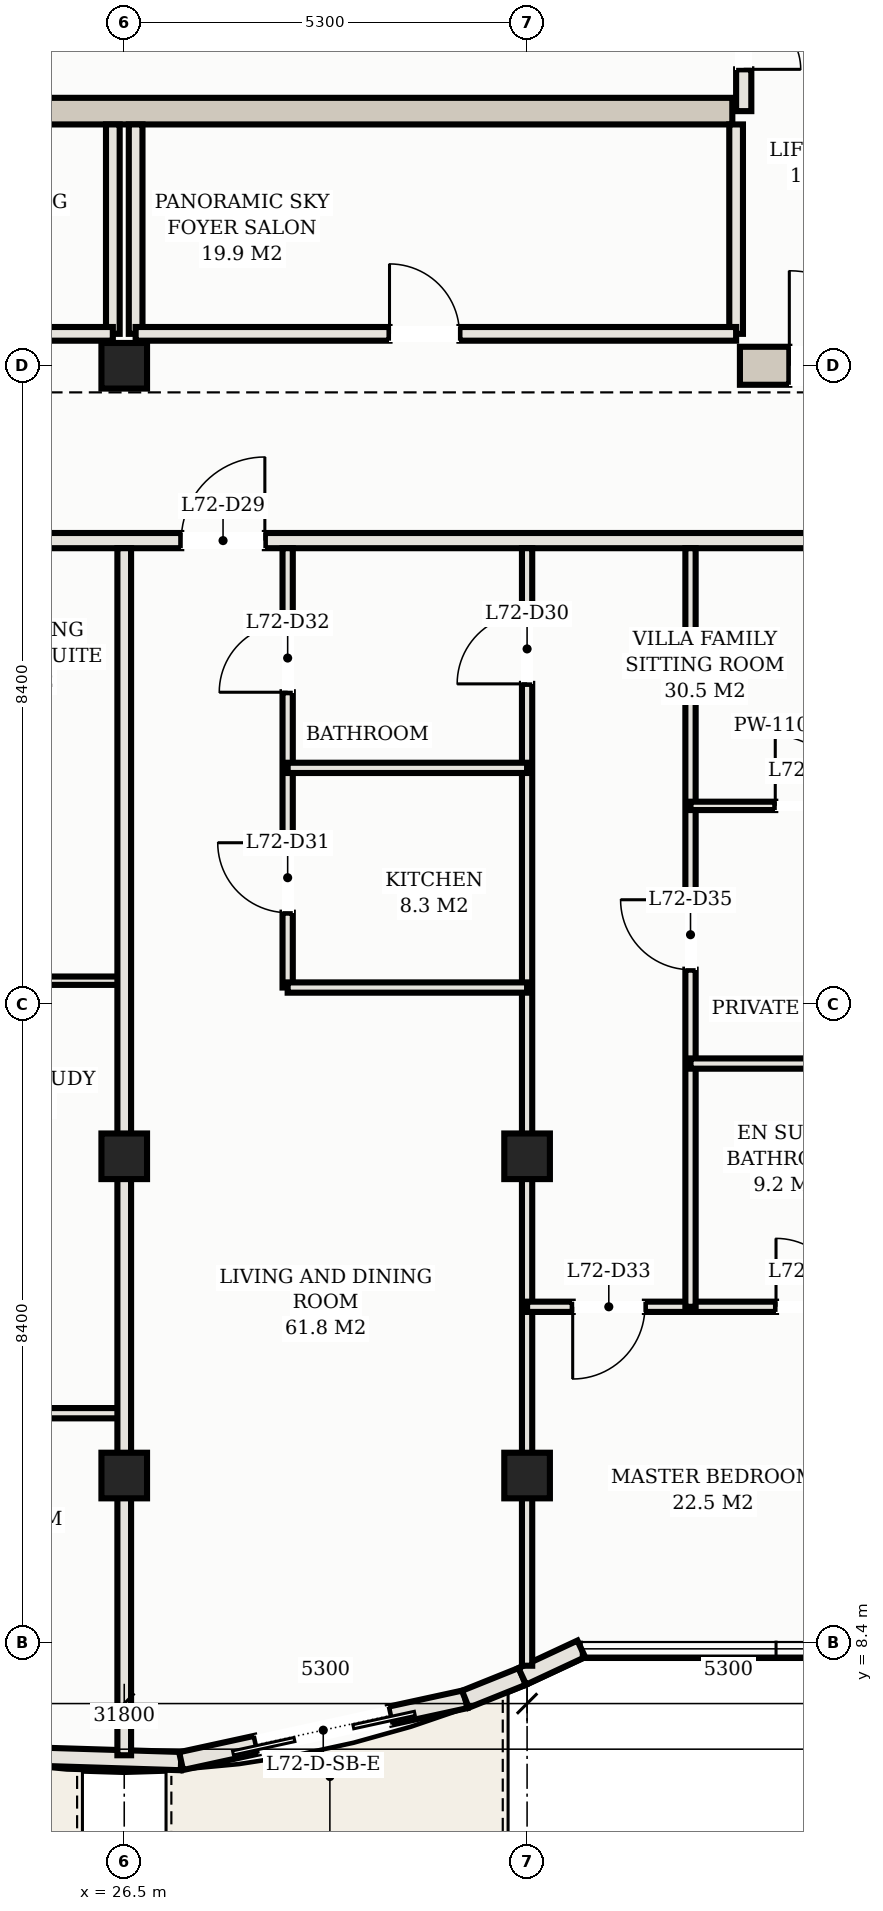
"""IFC4 building model, lengths in metres.
Left out: names, types, materials, properties, quantities, classifications, styles, units other than length and angle.
Written with IfcOpenShell. Run it as: python <this file> out.ifc"""

import sys

from ifc_helpers import new_model, si_unit, direction, frame, frame_2d, origin, origin_2d, place, context, subcontext, project, spatial, rectangle, hollow_rectangle, extrude, element, fill, save


model = new_model("IFC4")
c1 = context("Model", 3, precision=1e-05, world=origin(), true_north=direction((0.0, 1.0)))
c2 = subcontext(c1, "Body", "Model", "MODEL_VIEW")
j1 = project(units=[si_unit("LENGTHUNIT", "METRE"), si_unit("PLANEANGLEUNIT", "RADIAN")], contexts=[c1])
p1 = place(None, origin())
s1 = spatial("IfcSite", under=j1, at=p1, CompositionType="ELEMENT")
p2 = place(p1, origin())
s2 = spatial("IfcBuilding", under=s1, at=p2, CompositionType="ELEMENT")
p3 = place(p2, frame((0.0, 0.0, 259.4)))
s3 = spatial("IfcBuildingStorey", under=s2, at=p3, CompositionType="ELEMENT", Elevation=259.4)
p4 = place(p3, frame((34.6, 25.2, 0.0), z_axis=(0.0, 0.0, 1.0), x_axis=(1.0, 0.0, 0.0)))
e1 = element("IfcWall", 1, at=p4, inside=s3, PredefinedType="SHEAR", context=c2, shape_type="SweptSolid", body=[
    extrude(rectangle(XDim=8.05, YDim=0.5, at=frame_2d((4.025, 0.0))), origin(), (0.0, 0.0, 1.0), 3.11),
])
p5 = place(p4, frame((0.65, 0.0, 0.0)))
e2 = element("IfcOpeningElement", 2, at=p5, cuts=e1, PredefinedType="OPENING", context=c2, shape_type="SweptSolid", body=[
    extrude(rectangle(XDim=1.25, YDim=2.2, at=frame_2d((0.625, 1.1))), frame((0.0, 0.26, 0.0), z_axis=(0.0, -1.0, 0.0), x_axis=(1.0, 0.0, 0.0)), (0.0, 0.0, 1.0), 0.52),
])
p6 = place(p3, frame((18.5, 28.55, 0.0), z_axis=(0.0, 0.0, 1.0), x_axis=(1.0, 0.0, 0.0)))
e3 = element("IfcWall", 3, at=p6, inside=s3, PredefinedType="SHEAR", context=c2, shape_type="SweptSolid", body=[
    extrude(rectangle(XDim=16.0, YDim=0.35, at=frame_2d((8.0, 0.0))), origin(), (0.0, 0.0, 1.0), 3.11),
])
for number, where, z_axis, x_axis in (
    (4, (26.5, 25.2, 0.0), (0.0, 0.0, 1.0), (1.0, 0.0, 0.0)),
    (5, (26.5, 14.8, 0.0), (0.0, 0.0, 1.0), (1.0, 0.0, 0.0)),
    (6, (26.5, 10.6, 0.0), (0.0, 0.0, 1.0), (1.0, 0.0, 0.0)),
    (7, (31.8, 14.8, 0.0), (0.0, 0.0, 1.0), (1.0, 0.0, 0.0)),
    (8, (31.8, 10.6, 0.0), (0.0, 0.0, 1.0), (1.0, 0.0, 0.0)),
):
    element("IfcColumn", number, at=place(p3, frame(where, z_axis=z_axis, x_axis=x_axis)), inside=s3, PredefinedType="COLUMN", context=c2, shape_type="SweptSolid", body=[
        extrude(hollow_rectangle(XDim=0.6, YDim=0.6, WallThickness=0.022, at=origin_2d()), origin(), (0.0, 0.0, 1.0), 3.3),
    ])
p7 = place(p3, frame((25.005, 6.913, 0.0), z_axis=(0.0, 0.0, 1.0), x_axis=(0.99951250052, -0.031221167572, 0.0)))
e9 = element("IfcWall", 9, at=p7, inside=s3, PredefinedType="SOLIDWALL", context=c2, shape_type="SweptSolid", body=[
    extrude(rectangle(XDim=2.244, YDim=0.24, at=frame_2d((1.122, 0.0))), origin(), (0.0, 0.0, 1.0), 3.11),
])
p8 = place(p3, frame((27.248, 6.843, 0.0), z_axis=(0.0, 0.0, 1.0), x_axis=(0.977126252677, 0.212660025225, 0.0)))
e10 = element("IfcWall", 10, at=p8, inside=s3, PredefinedType="SOLIDWALL", context=c2, shape_type="SweptSolid", body=[
    extrude(rectangle(XDim=3.828, YDim=0.24, at=frame_2d((1.914, 0.0))), origin(), (0.0, 0.0, 1.0), 3.11),
])
p9 = place(p8, frame((1.014, 0.0, 0.0)))
e11 = element("IfcOpeningElement", 11, at=p9, cuts=e10, PredefinedType="OPENING", context=c2, shape_type="SweptSolid", body=[
    extrude(rectangle(XDim=1.8, YDim=2.2, at=frame_2d((0.9, 1.1))), frame((0.0, 0.13, 0.0), z_axis=(0.0, -1.0, 0.0), x_axis=(1.0, 0.0, 0.0)), (0.0, 0.0, 1.0), 0.26),
])
p10 = place(p3, frame((30.988, 7.657, 0.0), z_axis=(0.0, 0.0, 1.0), x_axis=(0.927870589467, 0.372902358805, 0.0)))
e12 = element("IfcWall", 12, at=p10, inside=s3, PredefinedType="SOLIDWALL", context=c2, shape_type="SweptSolid", body=[
    extrude(rectangle(XDim=0.807, YDim=0.24, at=frame_2d((0.404, 0.0))), origin(), (0.0, 0.0, 1.0), 3.11),
])
p11 = place(p3, frame((31.737, 7.958, 0.0), z_axis=(0.0, 0.0, 1.0), x_axis=(0.906190424584, 0.422869855147, 0.0)))
e13 = element("IfcWall", 13, at=p11, inside=s3, PredefinedType="SOLIDWALL", context=c2, shape_type="SweptSolid", body=[
    extrude(rectangle(XDim=0.856, YDim=0.24, at=frame_2d((0.428, 0.0))), origin(), (0.0, 0.0, 1.0), 3.11),
])
p12 = place(p3, frame((34.65, 28.55, 0.0), z_axis=(0.0, 0.0, 1.0), x_axis=(0.0, 1.0, 0.0)))
e14 = element("IfcWall", 14, at=p12, inside=s3, PredefinedType="PARTITIONING", context=c2, shape_type="SweptSolid", body=[
    extrude(rectangle(XDim=2.6, YDim=0.2, at=frame_2d((1.3, 0.0))), origin(), (0.0, 0.0, 1.0), 2.45),
])
p13 = place(p12, frame((0.55, 0.0, 0.0)))
e15 = element("IfcOpeningElement", 15, at=p13, cuts=e14, PredefinedType="OPENING", context=c2, shape_type="SweptSolid", body=[
    extrude(rectangle(XDim=1.5, YDim=2.25, at=frame_2d((0.75, 1.125))), frame((0.0, 0.11, 0.0), z_axis=(0.0, -1.0, 0.0), x_axis=(1.0, 0.0, 0.0)), (0.0, 0.0, 1.0), 0.22),
])
p14 = place(p3, frame((26.35, 25.62, 0.0), z_axis=(0.0, 0.0, 1.0), x_axis=(0.0, 1.0, 0.0)))
e16 = element("IfcWall", 16, at=p14, inside=s3, PredefinedType="PARTITIONING", context=c2, shape_type="SweptSolid", body=[
    extrude(rectangle(XDim=2.755, YDim=0.18, at=frame_2d((1.377, 0.0))), origin(), (0.0, 0.0, 1.0), 2.45),
])
p15 = place(p3, frame((18.45, 25.62, 0.0), z_axis=(0.0, 0.0, 1.0), x_axis=(1.0, 0.0, 0.0)))
e17 = element("IfcWall", 17, at=p15, inside=s3, PredefinedType="PARTITIONING", context=c2, shape_type="SweptSolid", body=[
    extrude(rectangle(XDim=7.9, YDim=0.18, at=frame_2d((3.95, 0.0))), origin(), (0.0, 0.0, 1.0), 2.45),
])
p16 = place(p15, frame((3.34, 0.0, 0.0)))
e18 = element("IfcOpeningElement", 18, at=p16, cuts=e17, PredefinedType="OPENING", context=c2, shape_type="SweptSolid", body=[
    extrude(rectangle(XDim=0.92, YDim=2.15, at=frame_2d((0.46, 1.075))), frame((0.0, 0.1, 0.0), z_axis=(0.0, -1.0, 0.0), x_axis=(1.0, 0.0, 0.0)), (0.0, 0.0, 1.0), 0.2),
])
for number, where, z_axis, x_axis in (
    (19, (26.65, 25.62, 0.0), (0.0, 0.0, 1.0), (0.0, 1.0, 0.0)),
    (20, (34.55, 25.62, 0.0), (0.0, 0.0, 1.0), (0.0, 1.0, 0.0)),
):
    element("IfcWall", number, at=place(p3, frame(where, z_axis=z_axis, x_axis=x_axis)), inside=s3, PredefinedType="PARTITIONING", context=c2, shape_type="SweptSolid", body=[
        extrude(rectangle(XDim=2.755, YDim=0.18, at=frame_2d((1.377, 0.0))), origin(), (0.0, 0.0, 1.0), 2.45),
    ])
p17 = place(p3, frame((26.65, 25.62, 0.0), z_axis=(0.0, 0.0, 1.0), x_axis=(1.0, 0.0, 0.0)))
e21 = element("IfcWall", 21, at=p17, inside=s3, PredefinedType="PARTITIONING", context=c2, shape_type="SweptSolid", body=[
    extrude(rectangle(XDim=7.9, YDim=0.18, at=frame_2d((3.95, 0.0))), origin(), (0.0, 0.0, 1.0), 2.45),
])
p18 = place(p17, frame((3.34, 0.0, 0.0)))
e22 = element("IfcOpeningElement", 22, at=p18, cuts=e21, PredefinedType="OPENING", context=c2, shape_type="SweptSolid", body=[
    extrude(rectangle(XDim=0.92, YDim=2.15, at=frame_2d((0.46, 1.075))), frame((0.0, 0.1, 0.0), z_axis=(0.0, -1.0, 0.0), x_axis=(1.0, 0.0, 0.0)), (0.0, 0.0, 1.0), 0.2),
])
p19 = place(p3, frame((8.6, 22.9, 0.0), z_axis=(0.0, 0.0, 1.0), x_axis=(1.0, 0.0, 0.0)))
e23 = element("IfcWall", 23, at=p19, inside=s3, PredefinedType="PARTITIONING", context=c2, shape_type="SweptSolid", body=[
    extrude(rectangle(XDim=35.8, YDim=0.2, at=frame_2d((17.9, 0.0))), origin(), (0.0, 0.0, 1.0), 2.45),
])
p20 = place(p19, frame((2.625, 0.0, 0.0)))
e24 = element("IfcOpeningElement", 24, at=p20, cuts=e23, PredefinedType="OPENING", context=c2, shape_type="SweptSolid", body=[
    extrude(rectangle(XDim=1.35, YDim=2.33, at=frame_2d((0.675, 1.165))), frame((0.0, 0.11, 0.0), z_axis=(0.0, -1.0, 0.0), x_axis=(1.0, 0.0, 0.0)), (0.0, 0.0, 1.0), 0.22),
])
p21 = place(p19, frame((18.65, 0.0, 0.0)))
e25 = element("IfcOpeningElement", 25, at=p21, cuts=e23, PredefinedType="OPENING", context=c2, shape_type="SweptSolid", body=[
    extrude(rectangle(XDim=1.1, YDim=2.25, at=frame_2d((0.55, 1.125))), frame((0.0, 0.11, 0.0), z_axis=(0.0, -1.0, 0.0), x_axis=(1.0, 0.0, 0.0)), (0.0, 0.0, 1.0), 0.22),
])
p22 = place(p19, frame((29.25, 0.0, 0.0)))
e26 = element("IfcOpeningElement", 26, at=p22, cuts=e23, PredefinedType="OPENING", context=c2, shape_type="SweptSolid", body=[
    extrude(rectangle(XDim=1.1, YDim=2.25, at=frame_2d((0.55, 1.125))), frame((0.0, 0.11, 0.0), z_axis=(0.0, -1.0, 0.0), x_axis=(1.0, 0.0, 0.0)), (0.0, 0.0, 1.0), 0.22),
])
p23 = place(p19, frame((0.505, 0.0, 0.0)))
e27 = element("IfcOpeningElement", 27, at=p23, cuts=e23, PredefinedType="OPENING", context=c2, shape_type="SweptSolid", body=[
    extrude(rectangle(XDim=0.9, YDim=2.15, at=frame_2d((0.45, 1.075))), frame((0.0, 0.11, 0.0), z_axis=(0.0, -1.0, 0.0), x_axis=(1.0, 0.0, 0.0)), (0.0, 0.0, 1.0), 0.22),
])
p24 = place(p19, frame((34.395, 0.0, 0.0)))
e28 = element("IfcOpeningElement", 28, at=p24, cuts=e23, PredefinedType="OPENING", context=c2, shape_type="SweptSolid", body=[
    extrude(rectangle(XDim=0.9, YDim=2.15, at=frame_2d((0.45, 1.075))), frame((0.0, 0.11, 0.0), z_axis=(0.0, -1.0, 0.0), x_axis=(1.0, 0.0, 0.0)), (0.0, 0.0, 1.0), 0.22),
])
p25 = place(p3, frame((21.2, 11.42, 0.0), z_axis=(0.0, 0.0, 1.0), x_axis=(1.0, 0.0, 0.0)))
e29 = element("IfcWall", 29, at=p25, inside=s3, PredefinedType="PARTITIONING", context=c2, shape_type="SweptSolid", body=[
    extrude(rectangle(XDim=5.3, YDim=0.135, at=frame_2d((2.65, 0.0))), origin(), (0.0, 0.0, 1.0), 2.45),
])
p26 = place(p25, frame((0.8, 0.0, 0.0)))
e30 = element("IfcOpeningElement", 30, at=p26, cuts=e29, PredefinedType="OPENING", context=c2, shape_type="SweptSolid", body=[
    extrude(rectangle(XDim=0.95, YDim=2.15, at=frame_2d((0.475, 1.075))), frame((0.0, 0.078, 0.0), z_axis=(0.0, -1.0, 0.0), x_axis=(1.0, 0.0, 0.0)), (0.0, 0.0, 1.0), 0.155),
])
p27 = place(p3, frame((23.35, 17.11, 0.0), z_axis=(0.0, 0.0, 1.0), x_axis=(1.0, 0.0, 0.0)))
e31 = element("IfcWall", 31, at=p27, inside=s3, PredefinedType="MOVABLE", context=c2, shape_type="SweptSolid", body=[
    extrude(rectangle(XDim=3.15, YDim=0.11, at=frame_2d((1.575, 0.0))), origin(), (0.0, 0.0, 1.0), 2.45),
])
p28 = place(p3, frame((26.5, 6.92, 0.0), z_axis=(0.0, 0.0, 1.0), x_axis=(0.0, 1.0, 0.0)))
e32 = element("IfcWall", 32, at=p28, inside=s3, PredefinedType="PARTITIONING", context=c2, shape_type="SweptSolid", body=[
    extrude(rectangle(XDim=15.88, YDim=0.18, at=frame_2d((7.94, 0.0))), origin(), (0.0, 0.0, 1.0), 2.45),
])
p29 = place(p3, frame((31.8, 8.098, 0.0), z_axis=(0.0, 0.0, 1.0), x_axis=(0.0, 1.0, 0.0)))
e33 = element("IfcWall", 33, at=p29, inside=s3, PredefinedType="PARTITIONING", context=c2, shape_type="SweptSolid", body=[
    extrude(rectangle(XDim=14.702, YDim=0.135, at=frame_2d((7.351, 0.0))), origin(), (0.0, 0.0, 1.0), 2.45),
])
p30 = place(p29, frame((12.917, 0.0, 0.0)))
e34 = element("IfcOpeningElement", 34, at=p30, cuts=e33, PredefinedType="OPENING", context=c2, shape_type="SweptSolid", body=[
    extrude(rectangle(XDim=0.92, YDim=2.15, at=frame_2d((0.46, 1.075))), frame((0.0, 0.078, 0.0), z_axis=(0.0, -1.0, 0.0), x_axis=(1.0, 0.0, 0.0)), (0.0, 0.0, 1.0), 0.155),
])
p31 = place(p3, frame((28.65, 17.02, 0.0), z_axis=(0.0, 0.0, 1.0), x_axis=(0.0, 1.0, 0.0)))
e35 = element("IfcWall", 35, at=p31, inside=s3, PredefinedType="PARTITIONING", context=c2, shape_type="SweptSolid", body=[
    extrude(rectangle(XDim=5.78, YDim=0.135, at=frame_2d((2.89, 0.0))), origin(), (0.0, 0.0, 1.0), 2.45),
])
p32 = place(p31, frame((0.985, 0.0, 0.0)))
e36 = element("IfcOpeningElement", 36, at=p32, cuts=e35, PredefinedType="OPENING", context=c2, shape_type="SweptSolid", body=[
    extrude(rectangle(XDim=0.92, YDim=2.15, at=frame_2d((0.46, 1.075))), frame((0.0, 0.078, 0.0), z_axis=(0.0, -1.0, 0.0), x_axis=(1.0, 0.0, 0.0)), (0.0, 0.0, 1.0), 0.155),
])
p33 = place(p31, frame((3.885, 0.0, 0.0)))
e37 = element("IfcOpeningElement", 37, at=p33, cuts=e35, PredefinedType="OPENING", context=c2, shape_type="SweptSolid", body=[
    extrude(rectangle(XDim=0.9, YDim=2.15, at=frame_2d((0.45, 1.075))), frame((0.0, 0.078, 0.0), z_axis=(0.0, -1.0, 0.0), x_axis=(1.0, 0.0, 0.0)), (0.0, 0.0, 1.0), 0.155),
])
for number, where, z_axis, x_axis in (
    (38, (28.65, 17.02, 0.0), (0.0, 0.0, 1.0), (1.0, 0.0, 0.0)),
    (39, (28.65, 19.91, 0.0), (0.0, 0.0, 1.0), (1.0, 0.0, 0.0)),
):
    element("IfcWall", number, at=place(p3, frame(where, z_axis=z_axis, x_axis=x_axis)), inside=s3, PredefinedType="PARTITIONING", context=c2, shape_type="SweptSolid", body=[
        extrude(rectangle(XDim=3.15, YDim=0.135, at=frame_2d((1.575, 0.0))), origin(), (0.0, 0.0, 1.0), 2.45),
    ])
p34 = place(p3, frame((31.8, 12.82, 0.0), z_axis=(0.0, 0.0, 1.0), x_axis=(1.0, 0.0, 0.0)))
e40 = element("IfcWall", 40, at=p34, inside=s3, PredefinedType="PARTITIONING", context=c2, shape_type="SweptSolid", body=[
    extrude(rectangle(XDim=5.3, YDim=0.135, at=frame_2d((2.65, 0.0))), origin(), (0.0, 0.0, 1.0), 2.45),
])
p35 = place(p34, frame((0.6, 0.0, 0.0)))
e41 = element("IfcOpeningElement", 41, at=p35, cuts=e40, PredefinedType="OPENING", context=c2, shape_type="SweptSolid", body=[
    extrude(rectangle(XDim=0.95, YDim=2.15, at=frame_2d((0.475, 1.075))), frame((0.0, 0.078, 0.0), z_axis=(0.0, -1.0, 0.0), x_axis=(1.0, 0.0, 0.0)), (0.0, 0.0, 1.0), 0.155),
])
p36 = place(p34, frame((3.275, 0.0, 0.0)))
e42 = element("IfcOpeningElement", 42, at=p36, cuts=e40, PredefinedType="OPENING", context=c2, shape_type="SweptSolid", body=[
    extrude(rectangle(XDim=0.9, YDim=2.15, at=frame_2d((0.45, 1.075))), frame((0.0, 0.078, 0.0), z_axis=(0.0, -1.0, 0.0), x_axis=(1.0, 0.0, 0.0)), (0.0, 0.0, 1.0), 0.155),
])
p37 = place(p3, frame((33.95, 12.82, 0.0), z_axis=(0.0, 0.0, 1.0), x_axis=(0.0, 1.0, 0.0)))
e43 = element("IfcWall", 43, at=p37, inside=s3, PredefinedType="PARTITIONING", context=c2, shape_type="SweptSolid", body=[
    extrude(rectangle(XDim=9.98, YDim=0.135, at=frame_2d((4.99, 0.0))), origin(), (0.0, 0.0, 1.0), 2.45),
])
p38 = place(p37, frame((4.435, 0.0, 0.0)))
e44 = element("IfcOpeningElement", 44, at=p38, cuts=e43, PredefinedType="OPENING", context=c2, shape_type="SweptSolid", body=[
    extrude(rectangle(XDim=0.92, YDim=2.15, at=frame_2d((0.46, 1.075))), frame((0.0, 0.078, 0.0), z_axis=(0.0, -1.0, 0.0), x_axis=(1.0, 0.0, 0.0)), (0.0, 0.0, 1.0), 0.155),
])
p39 = place(p3, frame((33.95, 16.02, 0.0), z_axis=(0.0, 0.0, 1.0), x_axis=(1.0, 0.0, 0.0)))
e45 = element("IfcWall", 45, at=p39, inside=s3, PredefinedType="PARTITIONING", context=c2, shape_type="SweptSolid", body=[
    extrude(rectangle(XDim=3.15, YDim=0.135, at=frame_2d((1.575, 0.0))), origin(), (0.0, 0.0, 1.0), 2.45),
])
p40 = place(p3, frame((33.95, 19.41, 0.0), z_axis=(0.0, 0.0, 1.0), x_axis=(1.0, 0.0, 0.0)))
e46 = element("IfcWall", 46, at=p40, inside=s3, PredefinedType="MOVABLE", context=c2, shape_type="SweptSolid", body=[
    extrude(rectangle(XDim=3.15, YDim=0.11, at=frame_2d((1.575, 0.0))), origin(), (0.0, 0.0, 1.0), 2.45),
])
p41 = place(p40, frame((1.115, 0.0, 0.0)))
e47 = element("IfcOpeningElement", 47, at=p41, cuts=e46, PredefinedType="OPENING", context=c2, shape_type="SweptSolid", body=[
    extrude(rectangle(XDim=0.92, YDim=2.15, at=frame_2d((0.46, 1.075))), frame((0.0, 0.065, 0.0), z_axis=(0.0, -1.0, 0.0), x_axis=(1.0, 0.0, 0.0)), (0.0, 0.0, 1.0), 0.13),
])
p42 = place(p9, frame((1.8, 0.0, 0.0), z_axis=(0.0, 0.0, 1.0), x_axis=(-1.0, 0.0, 0.0)))
e48 = element("IfcDoor", 48, at=p42, inside=s3, OperationType="DOUBLE_DOOR_SLIDING", PredefinedType="DOOR", context=c2, shape_type="SweptSolid", body=[
    extrude(rectangle(XDim=1.8, YDim=2.2, at=frame_2d((0.9, 1.1))), frame((0.0, 0.025, 0.0), z_axis=(0.0, -1.0, 0.0), x_axis=(1.0, 0.0, 0.0)), (0.0, 0.0, 1.0), 0.05),
])
fill(e11, e48)
p43 = place(p5, origin())
e49 = element("IfcDoor", 49, at=p43, inside=s3, OperationType="SINGLE_SWING_LEFT", PredefinedType="DOOR", context=c2, shape_type="SweptSolid", body=[
    extrude(rectangle(XDim=1.25, YDim=2.2, at=frame_2d((0.625, 1.1))), frame((0.0, 0.025, 0.0), z_axis=(0.0, -1.0, 0.0), x_axis=(1.0, 0.0, 0.0)), (0.0, 0.0, 1.0), 0.05),
])
fill(e2, e49)
p44 = place(p13, frame((1.5, 0.0, 0.0), z_axis=(0.0, 0.0, 1.0), x_axis=(-1.0, 0.0, 0.0)))
e50 = element("IfcDoor", 50, at=p44, inside=s3, OperationType="DOUBLE_DOOR_SINGLE_SWING", PredefinedType="DOOR", context=c2, shape_type="SweptSolid", body=[
    extrude(rectangle(XDim=1.5, YDim=2.25, at=frame_2d((0.75, 1.125))), frame((0.0, 0.025, 0.0), z_axis=(0.0, -1.0, 0.0), x_axis=(1.0, 0.0, 0.0)), (0.0, 0.0, 1.0), 0.05),
])
fill(e15, e50)
p45 = place(p18, origin())
e51 = element("IfcDoor", 51, at=p45, inside=s3, OperationType="SINGLE_SWING_LEFT", PredefinedType="DOOR", context=c2, shape_type="SweptSolid", body=[
    extrude(rectangle(XDim=0.92, YDim=2.15, at=frame_2d((0.46, 1.075))), frame((0.0, 0.025, 0.0), z_axis=(0.0, -1.0, 0.0), x_axis=(1.0, 0.0, 0.0)), (0.0, 0.0, 1.0), 0.05),
])
fill(e22, e51)
p46 = place(p21, origin())
e52 = element("IfcDoor", 52, at=p46, inside=s3, OperationType="SINGLE_SWING_RIGHT", PredefinedType="DOOR", context=c2, shape_type="SweptSolid", body=[
    extrude(rectangle(XDim=1.1, YDim=2.25, at=frame_2d((0.55, 1.125))), frame((0.0, 0.025, 0.0), z_axis=(0.0, -1.0, 0.0), x_axis=(1.0, 0.0, 0.0)), (0.0, 0.0, 1.0), 0.05),
])
fill(e25, e52)
p47 = place(p30, origin())
e53 = element("IfcDoor", 53, at=p47, inside=s3, OperationType="SINGLE_SWING_LEFT", PredefinedType="DOOR", context=c2, shape_type="SweptSolid", body=[
    extrude(rectangle(XDim=0.92, YDim=2.15, at=frame_2d((0.46, 1.075))), frame((0.0, 0.025, 0.0), z_axis=(0.0, -1.0, 0.0), x_axis=(1.0, 0.0, 0.0)), (0.0, 0.0, 1.0), 0.05),
])
fill(e34, e53)
p48 = place(p32, origin())
e54 = element("IfcDoor", 54, at=p48, inside=s3, OperationType="SINGLE_SWING_RIGHT", PredefinedType="DOOR", context=c2, shape_type="SweptSolid", body=[
    extrude(rectangle(XDim=0.92, YDim=2.15, at=frame_2d((0.46, 1.075))), frame((0.0, 0.025, 0.0), z_axis=(0.0, -1.0, 0.0), x_axis=(1.0, 0.0, 0.0)), (0.0, 0.0, 1.0), 0.05),
])
fill(e36, e54)
p49 = place(p33, origin())
e55 = element("IfcDoor", 55, at=p49, inside=s3, OperationType="SINGLE_SWING_LEFT", PredefinedType="DOOR", context=c2, shape_type="SweptSolid", body=[
    extrude(rectangle(XDim=0.9, YDim=2.15, at=frame_2d((0.45, 1.075))), frame((0.0, 0.025, 0.0), z_axis=(0.0, -1.0, 0.0), x_axis=(1.0, 0.0, 0.0)), (0.0, 0.0, 1.0), 0.05),
])
fill(e37, e55)
p50 = place(p35, frame((0.95, 0.0, 0.0), z_axis=(0.0, 0.0, 1.0), x_axis=(-1.0, 0.0, 0.0)))
e56 = element("IfcDoor", 56, at=p50, inside=s3, OperationType="SINGLE_SWING_RIGHT", PredefinedType="DOOR", context=c2, shape_type="SweptSolid", body=[
    extrude(rectangle(XDim=0.95, YDim=2.15, at=frame_2d((0.475, 1.075))), frame((0.0, 0.025, 0.0), z_axis=(0.0, -1.0, 0.0), x_axis=(1.0, 0.0, 0.0)), (0.0, 0.0, 1.0), 0.05),
])
fill(e41, e56)
p51 = place(p36, origin())
e57 = element("IfcDoor", 57, at=p51, inside=s3, OperationType="SINGLE_SWING_LEFT", PredefinedType="DOOR", context=c2, shape_type="SweptSolid", body=[
    extrude(rectangle(XDim=0.9, YDim=2.15, at=frame_2d((0.45, 1.075))), frame((0.0, 0.025, 0.0), z_axis=(0.0, -1.0, 0.0), x_axis=(1.0, 0.0, 0.0)), (0.0, 0.0, 1.0), 0.05),
])
fill(e42, e57)
p52 = place(p38, origin())
e58 = element("IfcDoor", 58, at=p52, inside=s3, OperationType="SINGLE_SWING_RIGHT", PredefinedType="DOOR", context=c2, shape_type="SweptSolid", body=[
    extrude(rectangle(XDim=0.92, YDim=2.15, at=frame_2d((0.46, 1.075))), frame((0.0, 0.025, 0.0), z_axis=(0.0, -1.0, 0.0), x_axis=(1.0, 0.0, 0.0)), (0.0, 0.0, 1.0), 0.05),
])
fill(e44, e58)
p53 = place(p41, origin())
e59 = element("IfcDoor", 59, at=p53, inside=s3, OperationType="SINGLE_SWING_LEFT", PredefinedType="DOOR", context=c2, shape_type="SweptSolid", body=[
    extrude(rectangle(XDim=0.92, YDim=2.15, at=frame_2d((0.46, 1.075))), frame((0.0, 0.025, 0.0), z_axis=(0.0, -1.0, 0.0), x_axis=(1.0, 0.0, 0.0)), (0.0, 0.0, 1.0), 0.05),
])
fill(e47, e59)
save(model, sys.argv[1])
